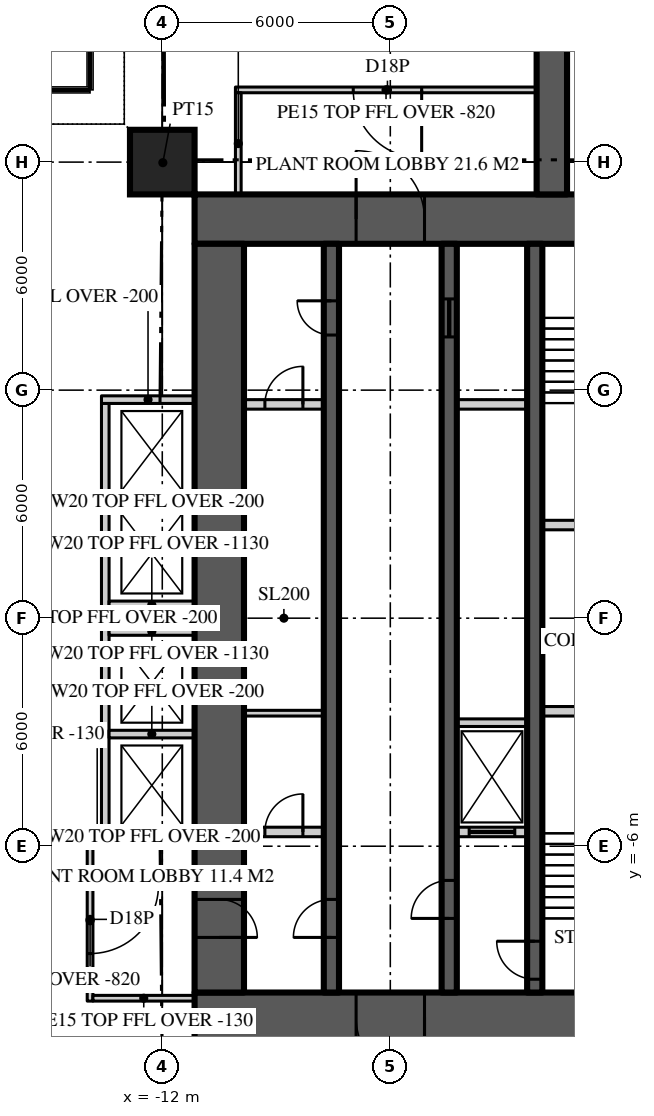
"""IFC4 building model, lengths in metres.
Left out: names, types, materials, properties, quantities, classifications, styles, units other than length and angle.
Written with IfcOpenShell. Run it as: python <this file> out.ifc"""

import sys

from ifc_helpers import new_model, si_unit, direction, frame, frame_2d, origin, origin_2d, place, context, subcontext, project, spatial, rectangle, extrude, element, fill, save


model = new_model("IFC4")
c1 = context("Model", 3, precision=1e-05, world=origin(), true_north=direction((0.0, 1.0)))
c2 = subcontext(c1, "Body", "Model", "MODEL_VIEW")
j1 = project(units=[si_unit("LENGTHUNIT", "METRE"), si_unit("PLANEANGLEUNIT", "RADIAN")], contexts=[c1])
p1 = place(None, origin())
s1 = spatial("IfcSite", under=j1, at=p1, CompositionType="ELEMENT")
p2 = place(p1, origin())
s2 = spatial("IfcBuilding", under=s1, at=p2, CompositionType="ELEMENT")
p3 = place(p2, frame((0.0, 0.0, 198.9)))
s3 = spatial("IfcBuildingStorey", under=s2, at=p3, CompositionType="ELEMENT", Elevation=198.9)
p4 = place(p3, frame((-11.15, 10.5, 0.0), z_axis=(0.0, 0.0, 1.0), x_axis=(1.0, 0.0, 0.0)))
e1 = element("IfcWall", 1, at=p4, inside=s3, PredefinedType="SHEAR", context=c2, shape_type="SweptSolid", body=[
    extrude(rectangle(XDim=22.3, YDim=1.3, at=frame_2d((11.15, 0.0))), origin(), (0.0, 0.0, 1.0), 6.0),
])
p5 = place(p4, frame((4.25, 0.0, 0.0)))
e2 = element("IfcOpeningElement", 2, at=p5, cuts=e1, PredefinedType="OPENING", context=c2, shape_type="SweptSolid", body=[
    extrude(rectangle(XDim=1.8, YDim=2.2, at=frame_2d((0.9, 1.1))), frame((0.0, 0.66, 0.0), z_axis=(0.0, -1.0, 0.0), x_axis=(1.0, 0.0, 0.0)), (0.0, 0.0, 1.0), 1.32),
])
p6 = place(p4, frame((16.25, 0.0, 0.0)))
e3 = element("IfcOpeningElement", 3, at=p6, cuts=e1, PredefinedType="OPENING", context=c2, shape_type="SweptSolid", body=[
    extrude(rectangle(XDim=1.8, YDim=2.2, at=frame_2d((0.9, 1.1))), frame((0.0, 0.66, 0.0), z_axis=(0.0, -1.0, 0.0), x_axis=(1.0, 0.0, 0.0)), (0.0, 0.0, 1.0), 1.32),
])
p7 = place(p3, frame((11.15, -10.5, 0.0), z_axis=(0.0, 0.0, 1.0), x_axis=(-1.0, 0.0, 0.0)))
e4 = element("IfcWall", 4, at=p7, inside=s3, PredefinedType="SHEAR", context=c2, shape_type="SweptSolid", body=[
    extrude(rectangle(XDim=22.3, YDim=1.3, at=frame_2d((11.15, 0.0))), origin(), (0.0, 0.0, 1.0), 6.0),
])
p8 = place(p7, frame((16.25, 0.0, 0.0)))
e5 = element("IfcOpeningElement", 5, at=p8, cuts=e4, PredefinedType="OPENING", context=c2, shape_type="SweptSolid", body=[
    extrude(rectangle(XDim=1.8, YDim=2.2, at=frame_2d((0.9, 1.1))), frame((0.0, 0.66, 0.0), z_axis=(0.0, -1.0, 0.0), x_axis=(1.0, 0.0, 0.0)), (0.0, 0.0, 1.0), 1.32),
])
p9 = place(p7, frame((4.25, 0.0, 0.0)))
e6 = element("IfcOpeningElement", 6, at=p9, cuts=e4, PredefinedType="OPENING", context=c2, shape_type="SweptSolid", body=[
    extrude(rectangle(XDim=1.8, YDim=2.2, at=frame_2d((0.9, 1.1))), frame((0.0, 0.66, 0.0), z_axis=(0.0, -1.0, 0.0), x_axis=(1.0, 0.0, 0.0)), (0.0, 0.0, 1.0), 1.32),
])
p10 = place(p3, frame((-10.5, 9.85, 0.0), z_axis=(0.0, 0.0, 1.0), x_axis=(0.0, -1.0, 0.0)))
e7 = element("IfcWall", 7, at=p10, inside=s3, PredefinedType="SHEAR", context=c2, shape_type="SweptSolid", body=[
    extrude(rectangle(XDim=19.7, YDim=1.3, at=frame_2d((9.85, 0.0))), origin(), (0.0, 0.0, 1.0), 6.0),
])
p11 = place(p10, frame((17.25, 0.0, 0.0)))
e8 = element("IfcOpeningElement", 8, at=p11, cuts=e7, PredefinedType="OPENING", context=c2, shape_type="SweptSolid", body=[
    extrude(rectangle(XDim=1.0, YDim=2.2, at=frame_2d((0.5, 1.1))), frame((0.0, 0.66, 0.0), z_axis=(0.0, -1.0, 0.0), x_axis=(1.0, 0.0, 0.0)), (0.0, 0.0, 1.0), 1.32),
])
p12 = place(p3, frame((-1.75, 11.15, 0.0), z_axis=(0.0, 0.0, 1.0), x_axis=(0.0, 1.0, 0.0)))
e9 = element("IfcWall", 9, at=p12, inside=s3, PredefinedType="SHEAR", context=c2, shape_type="SweptSolid", body=[
    extrude(rectangle(XDim=15.25, YDim=0.8, at=frame_2d((7.625, 0.0))), origin(), (0.0, 0.0, 1.0), 6.0),
])
p13 = place(p3, frame((-12.0, 12.0, 0.0), z_axis=(0.0, 0.0, 1.0), x_axis=(1.0, 0.0, 0.0)))
e10 = element("IfcColumn", 10, at=p13, inside=s3, PredefinedType="COLUMN", context=c2, shape_type="SweptSolid", body=[
    extrude(rectangle(XDim=1.7, YDim=1.7, at=origin_2d()), origin(), (0.0, 0.0, 1.0), 6.0),
])
p14 = place(p3, frame((-7.55, -9.85, 0.0), z_axis=(0.0, 0.0, 1.0), x_axis=(0.0, 1.0, 0.0)))
e11 = element("IfcWall", 11, at=p14, inside=s3, PredefinedType="SHEAR", context=c2, shape_type="SweptSolid", body=[
    extrude(rectangle(XDim=19.7, YDim=0.4, at=frame_2d((9.85, 0.0))), origin(), (0.0, 0.0, 1.0), 6.0),
])
p15 = place(p14, frame((1.45, 0.0, 0.0)))
e12 = element("IfcOpeningElement", 12, at=p15, cuts=e11, PredefinedType="OPENING", context=c2, shape_type="SweptSolid", body=[
    extrude(rectangle(XDim=1.0, YDim=2.2, at=frame_2d((0.5, 1.1))), frame((0.0, 0.21, 0.0), z_axis=(0.0, -1.0, 0.0), x_axis=(1.0, 0.0, 0.0)), (0.0, 0.0, 1.0), 0.42),
])
p16 = place(p14, frame((17.3, 0.0, 0.0)))
e13 = element("IfcOpeningElement", 13, at=p16, cuts=e11, PredefinedType="OPENING", context=c2, shape_type="SweptSolid", body=[
    extrude(rectangle(XDim=0.9, YDim=2.1, at=frame_2d((0.45, 1.05))), frame((0.0, 0.21, 0.0), z_axis=(0.0, -1.0, 0.0), x_axis=(1.0, 0.0, 0.0)), (0.0, 0.0, 1.0), 0.42),
])
p17 = place(p3, frame((-4.45, -9.85, 0.0), z_axis=(0.0, 0.0, 1.0), x_axis=(0.0, 1.0, 0.0)))
e14 = element("IfcWall", 14, at=p17, inside=s3, PredefinedType="SHEAR", context=c2, shape_type="SweptSolid", body=[
    extrude(rectangle(XDim=19.7, YDim=0.4, at=frame_2d((9.85, 0.0))), origin(), (0.0, 0.0, 1.0), 6.0),
])
p18 = place(p17, frame((1.95, 0.0, 0.0)))
e15 = element("IfcOpeningElement", 15, at=p18, cuts=e14, PredefinedType="OPENING", context=c2, shape_type="SweptSolid", body=[
    extrude(rectangle(XDim=1.0, YDim=2.2, at=frame_2d((0.5, 1.1))), frame((0.0, 0.21, 0.0), z_axis=(0.0, -1.0, 0.0), x_axis=(1.0, 0.0, 0.0)), (0.0, 0.0, 1.0), 0.42),
])
p19 = place(p17, frame((17.25, 0.0, 0.0)))
e16 = element("IfcOpeningElement", 16, at=p19, cuts=e14, PredefinedType="OPENING", context=c2, shape_type="SweptSolid", body=[
    extrude(rectangle(XDim=1.0, YDim=2.1, at=frame_2d((0.5, 1.05))), frame((0.0, 0.21, 0.0), z_axis=(0.0, -1.0, 0.0), x_axis=(1.0, 0.0, 0.0)), (0.0, 0.0, 1.0), 0.42),
])
p20 = place(p3, frame((-2.2, -9.85, 0.0), z_axis=(0.0, 0.0, 1.0), x_axis=(0.0, 1.0, 0.0)))
e17 = element("IfcWall", 17, at=p20, inside=s3, PredefinedType="SHEAR", context=c2, shape_type="SweptSolid", body=[
    extrude(rectangle(XDim=19.7, YDim=0.4, at=frame_2d((9.85, 0.0))), origin(), (0.0, 0.0, 1.0), 6.0),
])
p21 = place(p20, frame((0.35, 0.0, 0.0)))
e18 = element("IfcOpeningElement", 18, at=p21, cuts=e17, PredefinedType="OPENING", context=c2, shape_type="SweptSolid", body=[
    extrude(rectangle(XDim=1.0, YDim=2.2, at=frame_2d((0.5, 1.1))), frame((0.0, 0.21, 0.0), z_axis=(0.0, -1.0, 0.0), x_axis=(1.0, 0.0, 0.0)), (0.0, 0.0, 1.0), 0.42),
])
p22 = place(p3, frame((-9.85, 5.625, 0.0), z_axis=(0.0, 0.0, 1.0), x_axis=(1.0, 0.0, 0.0)))
e19 = element("IfcWall", 19, at=p22, inside=s3, PredefinedType="SOLIDWALL", context=c2, shape_type="SweptSolid", body=[
    extrude(rectangle(XDim=2.1, YDim=0.25, at=frame_2d((1.05, 0.0))), origin(), (0.0, 0.0, 1.0), 5.8),
])
p23 = place(p22, frame((0.55, 0.0, 0.0)))
e20 = element("IfcOpeningElement", 20, at=p23, cuts=e19, PredefinedType="OPENING", context=c2, shape_type="SweptSolid", body=[
    extrude(rectangle(XDim=1.0, YDim=2.2, at=frame_2d((0.5, 1.1))), frame((0.0, 0.135, 0.0), z_axis=(0.0, -1.0, 0.0), x_axis=(1.0, 0.0, 0.0)), (0.0, 0.0, 1.0), 0.27),
])
p24 = place(p3, frame((-4.25, 5.625, 0.0), z_axis=(0.0, 0.0, 1.0), x_axis=(1.0, 0.0, 0.0)))
e21 = element("IfcWall", 21, at=p24, inside=s3, PredefinedType="SOLIDWALL", context=c2, shape_type="SweptSolid", body=[
    extrude(rectangle(XDim=1.85, YDim=0.25, at=frame_2d((0.925, 0.0))), origin(), (0.0, 0.0, 1.0), 5.8),
])
p25 = place(p3, frame((-9.85, -5.625, 0.0), z_axis=(0.0, 0.0, 1.0), x_axis=(1.0, 0.0, 0.0)))
e22 = element("IfcWall", 22, at=p25, inside=s3, PredefinedType="SOLIDWALL", context=c2, shape_type="SweptSolid", body=[
    extrude(rectangle(XDim=2.1, YDim=0.25, at=frame_2d((1.05, 0.0))), origin(), (0.0, 0.0, 1.0), 5.8),
])
p26 = place(p25, frame((0.55, 0.0, 0.0)))
e23 = element("IfcOpeningElement", 23, at=p26, cuts=e22, PredefinedType="OPENING", context=c2, shape_type="SweptSolid", body=[
    extrude(rectangle(XDim=1.0, YDim=2.2, at=frame_2d((0.5, 1.1))), frame((0.0, 0.135, 0.0), z_axis=(0.0, -1.0, 0.0), x_axis=(1.0, 0.0, 0.0)), (0.0, 0.0, 1.0), 0.27),
])
p27 = place(p3, frame((-4.25, -5.625, 0.0), z_axis=(0.0, 0.0, 1.0), x_axis=(1.0, 0.0, 0.0)))
e24 = element("IfcWall", 24, at=p27, inside=s3, PredefinedType="SOLIDWALL", context=c2, shape_type="SweptSolid", body=[
    extrude(rectangle(XDim=1.85, YDim=0.25, at=frame_2d((0.925, 0.0))), origin(), (0.0, 0.0, 1.0), 5.8),
])
p28 = place(p27, frame((0.325, 0.0, 0.0)))
e25 = element("IfcOpeningElement", 25, at=p28, cuts=e24, PredefinedType="OPENING", context=c2, shape_type="SweptSolid", body=[
    extrude(rectangle(XDim=1.2, YDim=2.2, at=frame_2d((0.6, 1.1))), frame((0.0, 0.135, 0.0), z_axis=(0.0, -1.0, 0.0), x_axis=(1.0, 0.0, 0.0)), (0.0, 0.0, 1.0), 0.27),
])
for number, where, z_axis, x_axis in (
    (26, (-2.0, -2.45, 0.0), (0.0, 0.0, 1.0), (1.0, 0.0, 0.0)),
    (27, (-2.0, 2.45, 0.0), (0.0, 0.0, 1.0), (1.0, 0.0, 0.0)),
):
    element("IfcWall", number, at=place(p3, frame(where, z_axis=z_axis, x_axis=x_axis)), inside=s3, PredefinedType="SOLIDWALL", context=c2, shape_type="SweptSolid", body=[
        extrude(rectangle(XDim=4.0, YDim=0.25, at=frame_2d((2.0, 0.0))), origin(), (0.0, 0.0, 1.0), 5.8),
    ])
p29 = place(p3, frame((-4.25, -2.75, 0.0), z_axis=(0.0, 0.0, 1.0), x_axis=(1.0, 0.0, 0.0)))
e28 = element("IfcWall", 28, at=p29, inside=s3, PredefinedType="SOLIDWALL", context=c2, shape_type="SweptSolid", body=[
    extrude(rectangle(XDim=1.85, YDim=0.2, at=frame_2d((0.925, 0.0))), origin(), (0.0, 0.0, 1.0), 5.8),
])
p30 = place(p3, frame((-13.9, -5.85, 0.0), z_axis=(0.0, 0.0, 1.0), x_axis=(0.0, -1.0, 0.0)))
e29 = element("IfcWall", 29, at=p30, inside=s3, PredefinedType="SOLIDWALL", context=c2, shape_type="SweptSolid", body=[
    extrude(rectangle(XDim=4.225, YDim=0.15, at=frame_2d((2.112, 0.0))), origin(), (0.0, 0.0, 1.0), 5.18),
])
p31 = place(p30, frame((1.175, 0.0, 0.0)))
e30 = element("IfcOpeningElement", 30, at=p31, cuts=e29, PredefinedType="OPENING", context=c2, shape_type="SweptSolid", body=[
    extrude(rectangle(XDim=1.8, YDim=2.4, at=frame_2d((0.9, 1.2))), frame((0.0, 0.085, 0.0), z_axis=(0.0, -1.0, 0.0), x_axis=(1.0, 0.0, 0.0)), (0.0, 0.0, 1.0), 0.17),
])
p32 = place(p3, frame((-11.15, -10.0, 0.0), z_axis=(0.0, 0.0, 1.0), x_axis=(-1.0, 0.0, 0.0)))
e31 = element("IfcWall", 31, at=p32, inside=s3, PredefinedType="SOLIDWALL", context=c2, shape_type="SweptSolid", body=[
    extrude(rectangle(XDim=2.675, YDim=0.15, at=frame_2d((1.337, 0.0))), origin(), (0.0, 0.0, 1.0), 5.87),
])
p33 = place(p3, frame((-13.6, -5.75, 0.0), z_axis=(0.0, 0.0, 1.0), x_axis=(-1.0, 0.0, 0.0)))
e32 = element("IfcWall", 32, at=p33, inside=s3, PredefinedType="SOLIDWALL", context=c2, shape_type="SweptSolid", body=[
    extrude(rectangle(XDim=0.225, YDim=0.2, at=frame_2d((0.112, 0.0))), origin(), (0.0, 0.0, 1.0), 5.87),
])
p34 = place(p3, frame((-2.15, 13.9, 0.0), z_axis=(0.0, 0.0, 1.0), x_axis=(-1.0, 0.0, 0.0)))
e33 = element("IfcWall", 33, at=p34, inside=s3, PredefinedType="SOLIDWALL", context=c2, shape_type="SweptSolid", body=[
    extrude(rectangle(XDim=7.925, YDim=0.15, at=frame_2d((3.962, 0.0))), origin(), (0.0, 0.0, 1.0), 5.18),
])
p35 = place(p34, frame((3.025, 0.0, 0.0)))
e34 = element("IfcOpeningElement", 34, at=p35, cuts=e33, PredefinedType="OPENING", context=c2, shape_type="SweptSolid", body=[
    extrude(rectangle(XDim=1.8, YDim=2.4, at=frame_2d((0.9, 1.2))), frame((0.0, 0.085, 0.0), z_axis=(0.0, -1.0, 0.0), x_axis=(1.0, 0.0, 0.0)), (0.0, 0.0, 1.0), 0.17),
])
p36 = place(p3, frame((-10.0, 11.15, 0.0), z_axis=(0.0, 0.0, 1.0), x_axis=(0.0, 1.0, 0.0)))
e35 = element("IfcWall", 35, at=p36, inside=s3, PredefinedType="SOLIDWALL", context=c2, shape_type="SweptSolid", body=[
    extrude(rectangle(XDim=2.675, YDim=0.15, at=frame_2d((1.337, 0.0))), origin(), (0.0, 0.0, 1.0), 5.87),
])
p37 = place(p3, frame((-13.5, 5.65, 0.0), z_axis=(0.0, 0.0, 1.0), x_axis=(0.0, -1.0, 0.0)))
e36 = element("IfcWall", 36, at=p37, inside=s3, PredefinedType="SOLIDWALL", context=c2, shape_type="SweptSolid", body=[
    extrude(rectangle(XDim=11.3, YDim=0.2, at=frame_2d((5.65, 0.0))), origin(), (0.0, 0.0, 1.0), 5.8),
])
for number, where, z_axis, x_axis in (
    (37, (-11.15, 5.75, 0.0), (0.0, 0.0, 1.0), (-1.0, 0.0, 0.0)),
    (38, (-11.15, -5.75, 0.0), (0.0, 0.0, 1.0), (-1.0, 0.0, 0.0)),
):
    element("IfcWall", number, at=place(p3, frame(where, z_axis=z_axis, x_axis=x_axis)), inside=s3, PredefinedType="SOLIDWALL", context=c2, shape_type="SweptSolid", body=[
        extrude(rectangle(XDim=2.45, YDim=0.2, at=frame_2d((1.225, 0.0))), origin(), (0.0, 0.0, 1.0), 5.8),
    ])
p38 = place(p3, frame((-11.15, 3.05, 0.0), z_axis=(0.0, 0.0, 1.0), x_axis=(-1.0, 0.0, 0.0)))
e39 = element("IfcWall", 39, at=p38, inside=s3, PredefinedType="SOLIDWALL", context=c2, shape_type="SweptSolid", body=[
    extrude(rectangle(XDim=2.25, YDim=0.2, at=frame_2d((1.125, 0.0))), origin(), (0.0, 0.0, 1.0), 5.8),
])
for number, where, z_axis, x_axis in (
    (40, (-11.15, 0.35, 0.0), (0.0, 0.0, 1.0), (-1.0, 0.0, 0.0)),
    (41, (-11.15, -0.35, 0.0), (0.0, 0.0, 1.0), (-1.0, 0.0, 0.0)),
):
    element("IfcWall", number, at=place(p3, frame(where, z_axis=z_axis, x_axis=x_axis)), inside=s3, PredefinedType="SOLIDWALL", context=c2, shape_type="SweptSolid", body=[
        extrude(rectangle(XDim=2.25, YDim=0.2, at=frame_2d((1.125, 0.0))), origin(), (0.0, 0.0, 1.0), 4.87),
    ])
p39 = place(p3, frame((-11.15, -3.05, 0.0), z_axis=(0.0, 0.0, 1.0), x_axis=(-1.0, 0.0, 0.0)))
e42 = element("IfcWall", 42, at=p39, inside=s3, PredefinedType="SOLIDWALL", context=c2, shape_type="SweptSolid", body=[
    extrude(rectangle(XDim=2.25, YDim=0.2, at=frame_2d((1.125, 0.0))), origin(), (0.0, 0.0, 1.0), 5.8),
])
p40 = place(p3, frame((-11.15, 11.15, 0.0), z_axis=(0.0, 0.0, 1.0), x_axis=(-0.707106781187, 0.707106781187, 0.0)))
e43 = element("IfcWall", 43, at=p40, inside=s3, PredefinedType="PARTITIONING", context=c2, shape_type="SweptSolid", body=[
    extrude(rectangle(XDim=2.362, YDim=0.15, at=frame_2d((1.181, 0.0))), origin(), (0.0, 0.0, 1.0), 5.32),
])
p41 = place(p3, frame((-9.85, -2.5, 0.0), z_axis=(0.0, 0.0, 1.0), x_axis=(1.0, 0.0, 0.0)))
e44 = element("IfcWall", 44, at=p41, inside=s3, PredefinedType="SOLIDWALL", context=c2, shape_type="SweptSolid", body=[
    extrude(rectangle(XDim=2.1, YDim=0.15, at=frame_2d((1.05, 0.0))), origin(), (0.0, 0.0, 1.0), 5.87),
])
p42 = place(p5, origin())
e45 = element("IfcDoor", 45, at=p42, inside=s3, OperationType="DOUBLE_DOOR_DOUBLE_SWING", PredefinedType="DOOR", context=c2, shape_type="SweptSolid", body=[
    extrude(rectangle(XDim=1.8, YDim=2.2, at=frame_2d((0.9, 1.1))), frame((0.0, 0.025, 0.0), z_axis=(0.0, -1.0, 0.0), x_axis=(1.0, 0.0, 0.0)), (0.0, 0.0, 1.0), 0.05),
])
fill(e2, e45)
p43 = place(p8, origin())
e46 = element("IfcDoor", 46, at=p43, inside=s3, OperationType="DOUBLE_DOOR_DOUBLE_SWING", PredefinedType="DOOR", context=c2, shape_type="SweptSolid", body=[
    extrude(rectangle(XDim=1.8, YDim=2.2, at=frame_2d((0.9, 1.1))), frame((0.0, 0.025, 0.0), z_axis=(0.0, -1.0, 0.0), x_axis=(1.0, 0.0, 0.0)), (0.0, 0.0, 1.0), 0.05),
])
fill(e5, e46)
p44 = place(p15, origin())
e47 = element("IfcDoor", 47, at=p44, inside=s3, OperationType="SINGLE_SWING_LEFT", PredefinedType="DOOR", context=c2, shape_type="SweptSolid", body=[
    extrude(rectangle(XDim=1.0, YDim=2.2, at=frame_2d((0.5, 1.1))), frame((0.0, 0.025, 0.0), z_axis=(0.0, -1.0, 0.0), x_axis=(1.0, 0.0, 0.0)), (0.0, 0.0, 1.0), 0.05),
])
fill(e12, e47)
p45 = place(p11, origin())
e48 = element("IfcDoor", 48, at=p45, inside=s3, OperationType="SINGLE_SWING_RIGHT", PredefinedType="DOOR", context=c2, shape_type="SweptSolid", body=[
    extrude(rectangle(XDim=1.0, YDim=2.2, at=frame_2d((0.5, 1.1))), frame((0.0, 0.025, 0.0), z_axis=(0.0, -1.0, 0.0), x_axis=(1.0, 0.0, 0.0)), (0.0, 0.0, 1.0), 0.05),
])
fill(e8, e48)
p46 = place(p18, origin())
e49 = element("IfcDoor", 49, at=p46, inside=s3, OperationType="SINGLE_SWING_LEFT", PredefinedType="DOOR", context=c2, shape_type="SweptSolid", body=[
    extrude(rectangle(XDim=1.0, YDim=2.2, at=frame_2d((0.5, 1.1))), frame((0.0, 0.025, 0.0), z_axis=(0.0, -1.0, 0.0), x_axis=(1.0, 0.0, 0.0)), (0.0, 0.0, 1.0), 0.05),
])
fill(e15, e49)
p47 = place(p21, origin())
e50 = element("IfcDoor", 50, at=p47, inside=s3, OperationType="SINGLE_SWING_RIGHT", PredefinedType="DOOR", context=c2, shape_type="SweptSolid", body=[
    extrude(rectangle(XDim=1.0, YDim=2.2, at=frame_2d((0.5, 1.1))), frame((0.0, 0.025, 0.0), z_axis=(0.0, -1.0, 0.0), x_axis=(1.0, 0.0, 0.0)), (0.0, 0.0, 1.0), 0.05),
])
fill(e18, e50)
p48 = place(p16, origin())
e51 = element("IfcDoor", 51, at=p48, inside=s3, OperationType="SINGLE_SWING_RIGHT", PredefinedType="DOOR", context=c2, shape_type="SweptSolid", body=[
    extrude(rectangle(XDim=0.9, YDim=2.1, at=frame_2d((0.45, 1.05))), frame((0.0, 0.025, 0.0), z_axis=(0.0, -1.0, 0.0), x_axis=(1.0, 0.0, 0.0)), (0.0, 0.0, 1.0), 0.05),
])
fill(e13, e51)
p49 = place(p19, origin())
e52 = element("IfcDoor", 52, at=p49, inside=s3, OperationType="SLIDING_TO_LEFT", PredefinedType="DOOR", context=c2, shape_type="SweptSolid", body=[
    extrude(rectangle(XDim=1.0, YDim=2.1, at=frame_2d((0.5, 1.05))), frame((0.0, 0.025, 0.0), z_axis=(0.0, -1.0, 0.0), x_axis=(1.0, 0.0, 0.0)), (0.0, 0.0, 1.0), 0.05),
])
fill(e16, e52)
p50 = place(p28, origin())
e53 = element("IfcDoor", 53, at=p50, inside=s3, OperationType="SLIDING_TO_LEFT", PredefinedType="DOOR", context=c2, shape_type="SweptSolid", body=[
    extrude(rectangle(XDim=1.2, YDim=2.2, at=frame_2d((0.6, 1.1))), frame((0.0, 0.025, 0.0), z_axis=(0.0, -1.0, 0.0), x_axis=(1.0, 0.0, 0.0)), (0.0, 0.0, 1.0), 0.05),
])
fill(e25, e53)
p51 = place(p31, origin())
e54 = element("IfcDoor", 54, at=p51, inside=s3, OperationType="DOUBLE_DOOR_DOUBLE_SWING", PredefinedType="DOOR", context=c2, shape_type="SweptSolid", body=[
    extrude(rectangle(XDim=1.8, YDim=2.4, at=frame_2d((0.9, 1.2))), frame((0.0, 0.025, 0.0), z_axis=(0.0, -1.0, 0.0), x_axis=(1.0, 0.0, 0.0)), (0.0, 0.0, 1.0), 0.05),
])
fill(e30, e54)
p52 = place(p35, origin())
e55 = element("IfcDoor", 55, at=p52, inside=s3, OperationType="DOUBLE_DOOR_DOUBLE_SWING", PredefinedType="DOOR", context=c2, shape_type="SweptSolid", body=[
    extrude(rectangle(XDim=1.8, YDim=2.4, at=frame_2d((0.9, 1.2))), frame((0.0, 0.025, 0.0), z_axis=(0.0, -1.0, 0.0), x_axis=(1.0, 0.0, 0.0)), (0.0, 0.0, 1.0), 0.05),
])
fill(e34, e55)
p53 = place(p23, origin())
e56 = element("IfcDoor", 56, at=p53, inside=s3, OperationType="SINGLE_SWING_RIGHT", PredefinedType="DOOR", context=c2, shape_type="SweptSolid", body=[
    extrude(rectangle(XDim=1.0, YDim=2.2, at=frame_2d((0.5, 1.1))), frame((0.0, 0.025, 0.0), z_axis=(0.0, -1.0, 0.0), x_axis=(1.0, 0.0, 0.0)), (0.0, 0.0, 1.0), 0.05),
])
fill(e20, e56)
p54 = place(p26, origin())
e57 = element("IfcDoor", 57, at=p54, inside=s3, OperationType="SINGLE_SWING_RIGHT", PredefinedType="DOOR", context=c2, shape_type="SweptSolid", body=[
    extrude(rectangle(XDim=1.0, YDim=2.2, at=frame_2d((0.5, 1.1))), frame((0.0, 0.025, 0.0), z_axis=(0.0, -1.0, 0.0), x_axis=(1.0, 0.0, 0.0)), (0.0, 0.0, 1.0), 0.05),
])
fill(e23, e57)
save(model, sys.argv[1])
